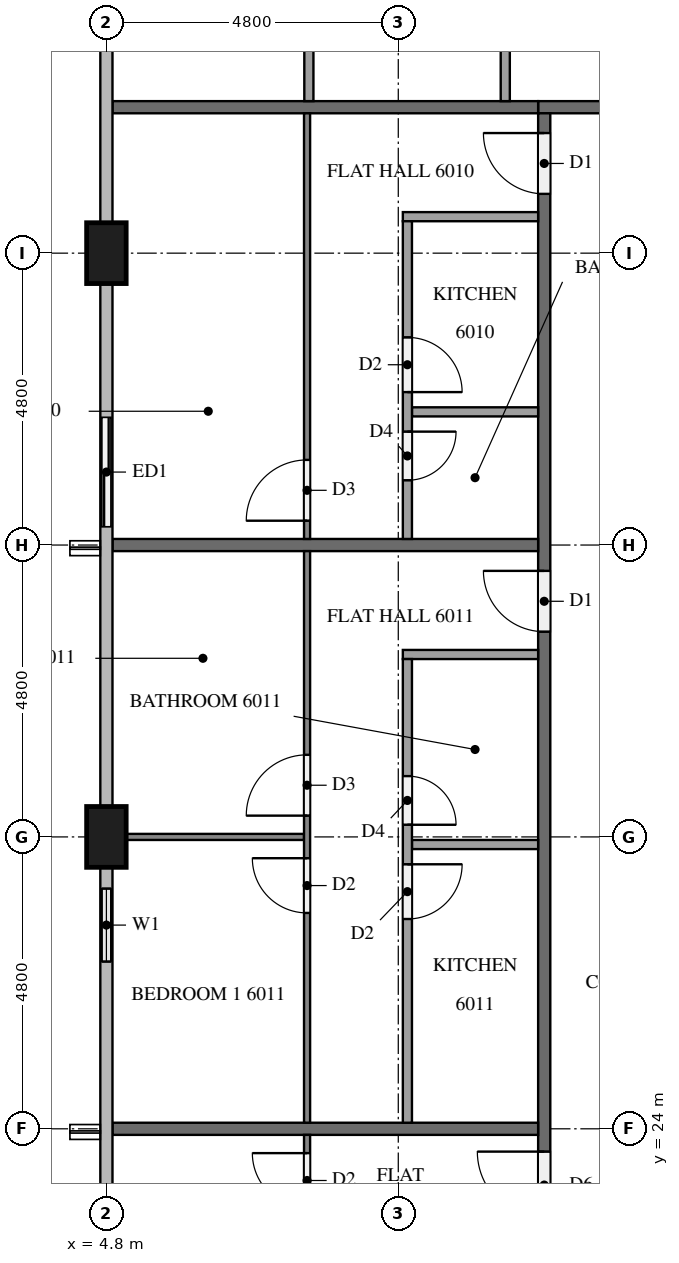
"""IFC4 building model, lengths in metres.
Left out: names, types, materials, properties, quantities, classifications, styles, units other than length and angle.
Written with IfcOpenShell. Run it as: python <this file> out.ifc"""

import sys

from ifc_helpers import new_model, si_unit, direction, frame, frame_2d, origin, origin_2d, place, context, subcontext, project, spatial, rectangle, extrude, element, fill, save


model = new_model("IFC4")
c1 = context("Model", 3, precision=1e-05, world=origin(), true_north=direction((0.0, 1.0)))
c2 = subcontext(c1, "Body", "Model", "MODEL_VIEW")
j1 = project(units=[si_unit("LENGTHUNIT", "METRE"), si_unit("PLANEANGLEUNIT", "RADIAN")], contexts=[c1])
p1 = place(None, origin())
s1 = spatial("IfcSite", under=j1, at=p1, CompositionType="ELEMENT")
p2 = place(p1, origin())
s2 = spatial("IfcBuilding", under=s1, at=p2, CompositionType="ELEMENT")
p3 = place(p2, frame((0.0, 0.0, 229.8)))
s3 = spatial("IfcBuildingStorey", under=s2, at=p3, CompositionType="ELEMENT", Elevation=229.8)
for number, where, z_axis, x_axis in (
    (1, (4.8, 38.4, 0.0), (0.0, 0.0, 1.0), (0.0, 1.0, 0.0)),
    (2, (4.8, 28.8, 0.0), (0.0, 0.0, 1.0), (0.0, 1.0, 0.0)),
):
    element("IfcColumn", number, at=place(p3, frame(where, z_axis=z_axis, x_axis=x_axis)), inside=s3, PredefinedType="COLUMN", context=c2, shape_type="SweptSolid", body=[
        extrude(rectangle(XDim=1.0, YDim=0.65, at=origin_2d()), origin(), (0.0, 0.0, 1.0), 3.1),
    ])
p4 = place(p3, frame((4.8, 36.0, 0.0), z_axis=(0.0, 0.0, 1.0), x_axis=(0.0, -1.0, 0.0)))
e3 = element("IfcWall", 3, at=p4, inside=s3, PredefinedType="SOLIDWALL", context=c2, shape_type="SweptSolid", body=[
    extrude(rectangle(XDim=2.4, YDim=0.15, at=frame_2d((1.2, 0.0))), origin(), (0.0, 0.0, 1.0), 3.1),
])
p5 = place(p4, frame((0.3, 0.0, 0.0)))
e4 = element("IfcOpeningElement", 4, at=p5, cuts=e3, PredefinedType="OPENING", context=c2, shape_type="SweptSolid", body=[
    extrude(rectangle(XDim=1.8, YDim=2.4, at=frame_2d((0.9, 1.2))), frame((0.0, 0.085, 0.0), z_axis=(0.0, -1.0, 0.0), x_axis=(1.0, 0.0, 0.0)), (0.0, 0.0, 1.0), 0.17),
])
p6 = place(p3, frame((4.8, 28.3, 0.0), z_axis=(0.0, 0.0, 1.0), x_axis=(0.0, -1.0, 0.0)))
e5 = element("IfcWall", 5, at=p6, inside=s3, PredefinedType="SOLIDWALL", context=c2, shape_type="SweptSolid", body=[
    extrude(rectangle(XDim=1.9, YDim=0.15, at=frame_2d((0.95, 0.0))), origin(), (0.0, 0.0, 1.0), 3.1),
])
p7 = place(p6, frame((0.35, 0.0, 0.9)))
e6 = element("IfcOpeningElement", 6, at=p7, cuts=e5, PredefinedType="OPENING", context=c2, shape_type="SweptSolid", body=[
    extrude(rectangle(XDim=1.2, YDim=1.4, at=frame_2d((0.6, 0.7))), frame((0.0, 0.085, 0.0), z_axis=(0.0, -1.0, 0.0), x_axis=(1.0, 0.0, 0.0)), (0.0, 0.0, 1.0), 0.17),
])
p8 = place(p3, frame((11.9, 40.8, 0.0), z_axis=(0.0, 0.0, 1.0), x_axis=(1.0, 0.0, 0.0)))
e7 = element("IfcWall", 7, at=p8, inside=s3, PredefinedType="PARTITIONING", context=c2, shape_type="SweptSolid", body=[
    extrude(rectangle(XDim=38.6, YDim=0.2, at=frame_2d((19.3, 0.0))), origin(), (0.0, 0.0, 1.0), 3.1),
])
p9 = place(p8, frame((37.075, 0.0, 0.0)))
e8 = element("IfcOpeningElement", 8, at=p9, cuts=e7, PredefinedType="OPENING", context=c2, shape_type="SweptSolid", body=[
    extrude(rectangle(XDim=1.0, YDim=2.1, at=frame_2d((0.5, 1.05))), frame((0.0, 0.11, 0.0), z_axis=(0.0, -1.0, 0.0), x_axis=(1.0, 0.0, 0.0)), (0.0, 0.0, 1.0), 0.22),
])
p10 = place(p8, frame((12.525, 0.0, 0.0)))
e9 = element("IfcOpeningElement", 9, at=p10, cuts=e7, PredefinedType="OPENING", context=c2, shape_type="SweptSolid", body=[
    extrude(rectangle(XDim=1.0, YDim=2.1, at=frame_2d((0.5, 1.05))), frame((0.0, 0.11, 0.0), z_axis=(0.0, -1.0, 0.0), x_axis=(1.0, 0.0, 0.0)), (0.0, 0.0, 1.0), 0.22),
])
p11 = place(p8, frame((10.625, 0.0, 0.0)))
e10 = element("IfcOpeningElement", 10, at=p11, cuts=e7, PredefinedType="OPENING", context=c2, shape_type="SweptSolid", body=[
    extrude(rectangle(XDim=1.1, YDim=2.1, at=frame_2d((0.55, 1.05))), frame((0.0, 0.11, 0.0), z_axis=(0.0, -1.0, 0.0), x_axis=(1.0, 0.0, 0.0)), (0.0, 0.0, 1.0), 0.22),
])
p12 = place(p3, frame((12.0, 12.1, 0.0), z_axis=(0.0, 0.0, 1.0), x_axis=(0.0, 1.0, 0.0)))
e11 = element("IfcWall", 11, at=p12, inside=s3, PredefinedType="PARTITIONING", context=c2, shape_type="SweptSolid", body=[
    extrude(rectangle(XDim=28.6, YDim=0.2, at=frame_2d((14.3, 0.0))), origin(), (0.0, 0.0, 1.0), 3.1),
])
p13 = place(p12, frame((27.275, 0.0, 0.0)))
e12 = element("IfcOpeningElement", 12, at=p13, cuts=e11, PredefinedType="OPENING", context=c2, shape_type="SweptSolid", body=[
    extrude(rectangle(XDim=1.0, YDim=2.1, at=frame_2d((0.5, 1.05))), frame((0.0, 0.11, 0.0), z_axis=(0.0, -1.0, 0.0), x_axis=(1.0, 0.0, 0.0)), (0.0, 0.0, 1.0), 0.22),
])
p14 = place(p12, frame((20.075, 0.0, 0.0)))
e13 = element("IfcOpeningElement", 13, at=p14, cuts=e11, PredefinedType="OPENING", context=c2, shape_type="SweptSolid", body=[
    extrude(rectangle(XDim=1.0, YDim=2.1, at=frame_2d((0.5, 1.05))), frame((0.0, 0.11, 0.0), z_axis=(0.0, -1.0, 0.0), x_axis=(1.0, 0.0, 0.0)), (0.0, 0.0, 1.0), 0.22),
])
p15 = place(p12, frame((10.425, 0.0, 0.0)))
e14 = element("IfcOpeningElement", 14, at=p15, cuts=e11, PredefinedType="OPENING", context=c2, shape_type="SweptSolid", body=[
    extrude(rectangle(XDim=1.1, YDim=2.1, at=frame_2d((0.55, 1.05))), frame((0.0, 0.11, 0.0), z_axis=(0.0, -1.0, 0.0), x_axis=(1.0, 0.0, 0.0)), (0.0, 0.0, 1.0), 0.22),
])
for number, where, z_axis, x_axis in (
    (15, (4.9, 40.8, 0.0), (0.0, 0.0, 1.0), (1.0, 0.0, 0.0)),
    (16, (4.9, 33.6, 0.0), (0.0, 0.0, 1.0), (1.0, 0.0, 0.0)),
    (17, (4.9, 24.0, 0.0), (0.0, 0.0, 1.0), (1.0, 0.0, 0.0)),
):
    element("IfcWall", number, at=place(p3, frame(where, z_axis=z_axis, x_axis=x_axis)), inside=s3, PredefinedType="PARTITIONING", context=c2, shape_type="SweptSolid", body=[
        extrude(rectangle(XDim=7.0, YDim=0.2, at=frame_2d((3.5, 0.0))), origin(), (0.0, 0.0, 1.0), 3.1),
    ])
for number, where, z_axis, x_axis in (
    (18, (11.359, 40.9, 0.0), (0.0, 0.0, 1.0), (0.0, 1.0, 0.0)),
    (19, (8.13, 40.9, 0.0), (0.0, 0.0, 1.0), (0.0, 1.0, 0.0)),
):
    element("IfcWall", number, at=place(p3, frame(where, z_axis=z_axis, x_axis=x_axis)), inside=s3, PredefinedType="PARTITIONING", context=c2, shape_type="SweptSolid", body=[
        extrude(rectangle(XDim=3.275, YDim=0.15, at=frame_2d((1.638, 0.0))), origin(), (0.0, 0.0, 1.0), 3.1),
    ])
p16 = place(p3, frame((8.1, 33.7, 0.0), z_axis=(0.0, 0.0, 1.0), x_axis=(0.0, 1.0, 0.0)))
e20 = element("IfcWall", 20, at=p16, inside=s3, PredefinedType="PARTITIONING", context=c2, shape_type="SweptSolid", body=[
    extrude(rectangle(XDim=7.0, YDim=0.1, at=frame_2d((3.5, 0.0))), origin(), (0.0, 0.0, 1.0), 3.1),
])
p17 = place(p16, frame((0.3, 0.0, 0.0)))
e21 = element("IfcOpeningElement", 21, at=p17, cuts=e20, PredefinedType="OPENING", context=c2, shape_type="SweptSolid", body=[
    extrude(rectangle(XDim=1.0, YDim=2.1, at=frame_2d((0.5, 1.05))), frame((0.0, 0.06, 0.0), z_axis=(0.0, -1.0, 0.0), x_axis=(1.0, 0.0, 0.0)), (0.0, 0.0, 1.0), 0.12),
])
p18 = place(p3, frame((11.9, 35.79, 0.0), z_axis=(0.0, 0.0, 1.0), x_axis=(-1.0, 0.0, 0.0)))
e22 = element("IfcWall", 22, at=p18, inside=s3, PredefinedType="PARTITIONING", context=c2, shape_type="SweptSolid", body=[
    extrude(rectangle(XDim=2.075, YDim=0.15, at=frame_2d((1.038, 0.0))), origin(), (0.0, 0.0, 1.0), 3.1),
])
p19 = place(p3, frame((11.9, 39.0, 0.0), z_axis=(0.0, 0.0, 1.0), x_axis=(-1.0, 0.0, 0.0)))
e23 = element("IfcWall", 23, at=p19, inside=s3, PredefinedType="PARTITIONING", context=c2, shape_type="SweptSolid", body=[
    extrude(rectangle(XDim=2.225, YDim=0.15, at=frame_2d((1.112, 0.0))), origin(), (0.0, 0.0, 1.0), 3.1),
])
p20 = place(p3, frame((9.75, 38.925, 0.0), z_axis=(0.0, 0.0, 1.0), x_axis=(0.0, -1.0, 0.0)))
e24 = element("IfcWall", 24, at=p20, inside=s3, PredefinedType="PARTITIONING", context=c2, shape_type="SweptSolid", body=[
    extrude(rectangle(XDim=5.225, YDim=0.15, at=frame_2d((2.613, 0.0))), origin(), (0.0, 0.0, 1.0), 3.1),
])
p21 = place(p20, frame((1.91, 0.0, 0.0)))
e25 = element("IfcOpeningElement", 25, at=p21, cuts=e24, PredefinedType="OPENING", context=c2, shape_type="SweptSolid", body=[
    extrude(rectangle(XDim=0.9, YDim=2.1, at=frame_2d((0.45, 1.05))), frame((0.0, 0.085, 0.0), z_axis=(0.0, -1.0, 0.0), x_axis=(1.0, 0.0, 0.0)), (0.0, 0.0, 1.0), 0.17),
])
p22 = place(p20, frame((3.46, 0.0, 0.0)))
e26 = element("IfcOpeningElement", 26, at=p22, cuts=e24, PredefinedType="OPENING", context=c2, shape_type="SweptSolid", body=[
    extrude(rectangle(XDim=0.8, YDim=2.1, at=frame_2d((0.4, 1.05))), frame((0.0, 0.085, 0.0), z_axis=(0.0, -1.0, 0.0), x_axis=(1.0, 0.0, 0.0)), (0.0, 0.0, 1.0), 0.17),
])
p23 = place(p3, frame((8.05, 28.8, 0.0), z_axis=(0.0, 0.0, 1.0), x_axis=(-1.0, 0.0, 0.0)))
e27 = element("IfcWall", 27, at=p23, inside=s3, PredefinedType="PARTITIONING", context=c2, shape_type="SweptSolid", body=[
    extrude(rectangle(XDim=2.925, YDim=0.1, at=frame_2d((1.462, 0.0))), origin(), (0.0, 0.0, 1.0), 3.1),
])
p24 = place(p3, frame((8.1, 24.1, 0.0), z_axis=(0.0, 0.0, 1.0), x_axis=(0.0, 1.0, 0.0)))
e28 = element("IfcWall", 28, at=p24, inside=s3, PredefinedType="PARTITIONING", context=c2, shape_type="SweptSolid", body=[
    extrude(rectangle(XDim=9.4, YDim=0.1, at=frame_2d((4.7, 0.0))), origin(), (0.0, 0.0, 1.0), 3.1),
])
p25 = place(p24, frame((5.05, 0.0, 0.0)))
e29 = element("IfcOpeningElement", 29, at=p25, cuts=e28, PredefinedType="OPENING", context=c2, shape_type="SweptSolid", body=[
    extrude(rectangle(XDim=1.0, YDim=2.1, at=frame_2d((0.5, 1.05))), frame((0.0, 0.06, 0.0), z_axis=(0.0, -1.0, 0.0), x_axis=(1.0, 0.0, 0.0)), (0.0, 0.0, 1.0), 0.12),
])
p26 = place(p24, frame((3.45, 0.0, 0.0)))
e30 = element("IfcOpeningElement", 30, at=p26, cuts=e28, PredefinedType="OPENING", context=c2, shape_type="SweptSolid", body=[
    extrude(rectangle(XDim=0.9, YDim=2.1, at=frame_2d((0.45, 1.05))), frame((0.0, 0.06, 0.0), z_axis=(0.0, -1.0, 0.0), x_axis=(1.0, 0.0, 0.0)), (0.0, 0.0, 1.0), 0.12),
])
p27 = place(p3, frame((11.9, 28.675, 0.0), z_axis=(0.0, 0.0, 1.0), x_axis=(-1.0, 0.0, 0.0)))
e31 = element("IfcWall", 31, at=p27, inside=s3, PredefinedType="PARTITIONING", context=c2, shape_type="SweptSolid", body=[
    extrude(rectangle(XDim=2.075, YDim=0.15, at=frame_2d((1.038, 0.0))), origin(), (0.0, 0.0, 1.0), 3.1),
])
p28 = place(p3, frame((11.9, 31.8, 0.0), z_axis=(0.0, 0.0, 1.0), x_axis=(-1.0, 0.0, 0.0)))
e32 = element("IfcWall", 32, at=p28, inside=s3, PredefinedType="PARTITIONING", context=c2, shape_type="SweptSolid", body=[
    extrude(rectangle(XDim=2.225, YDim=0.15, at=frame_2d((1.112, 0.0))), origin(), (0.0, 0.0, 1.0), 3.1),
])
p29 = place(p3, frame((9.75, 31.725, 0.0), z_axis=(0.0, 0.0, 1.0), x_axis=(0.0, -1.0, 0.0)))
e33 = element("IfcWall", 33, at=p29, inside=s3, PredefinedType="PARTITIONING", context=c2, shape_type="SweptSolid", body=[
    extrude(rectangle(XDim=7.625, YDim=0.15, at=frame_2d((3.812, 0.0))), origin(), (0.0, 0.0, 1.0), 3.1),
])
p30 = place(p29, frame((1.925, 0.0, 0.0)))
e34 = element("IfcOpeningElement", 34, at=p30, cuts=e33, PredefinedType="OPENING", context=c2, shape_type="SweptSolid", body=[
    extrude(rectangle(XDim=0.8, YDim=2.1, at=frame_2d((0.4, 1.05))), frame((0.0, 0.085, 0.0), z_axis=(0.0, -1.0, 0.0), x_axis=(1.0, 0.0, 0.0)), (0.0, 0.0, 1.0), 0.17),
])
p31 = place(p29, frame((3.375, 0.0, 0.0)))
e35 = element("IfcOpeningElement", 35, at=p31, cuts=e33, PredefinedType="OPENING", context=c2, shape_type="SweptSolid", body=[
    extrude(rectangle(XDim=0.9, YDim=2.1, at=frame_2d((0.45, 1.05))), frame((0.0, 0.085, 0.0), z_axis=(0.0, -1.0, 0.0), x_axis=(1.0, 0.0, 0.0)), (0.0, 0.0, 1.0), 0.17),
])
p32 = place(p3, frame((8.1, 5.302, 0.0), z_axis=(0.0, 0.0, 1.0), x_axis=(0.0, 1.0, 0.0)))
e36 = element("IfcWall", 36, at=p32, inside=s3, PredefinedType="PARTITIONING", context=c2, shape_type="SweptSolid", body=[
    extrude(rectangle(XDim=18.598, YDim=0.1, at=frame_2d((9.299, 0.0))), origin(), (0.0, 0.0, 1.0), 3.1),
])
p33 = place(p32, frame((17.398, 0.0, 0.0)))
e37 = element("IfcOpeningElement", 37, at=p33, cuts=e36, PredefinedType="OPENING", context=c2, shape_type="SweptSolid", body=[
    extrude(rectangle(XDim=0.9, YDim=2.1, at=frame_2d((0.45, 1.05))), frame((0.0, 0.06, 0.0), z_axis=(0.0, -1.0, 0.0), x_axis=(1.0, 0.0, 0.0)), (0.0, 0.0, 1.0), 0.12),
])
p34 = place(p32, frame((9.448, 0.0, 0.0)))
e38 = element("IfcOpeningElement", 38, at=p34, cuts=e36, PredefinedType="OPENING", context=c2, shape_type="SweptSolid", body=[
    extrude(rectangle(XDim=0.9, YDim=2.1, at=frame_2d((0.45, 1.05))), frame((0.0, 0.06, 0.0), z_axis=(0.0, -1.0, 0.0), x_axis=(1.0, 0.0, 0.0)), (0.0, 0.0, 1.0), 0.12),
])
p35 = place(p32, frame((7.748, 0.0, 0.0)))
e39 = element("IfcOpeningElement", 39, at=p35, cuts=e36, PredefinedType="OPENING", context=c2, shape_type="SweptSolid", body=[
    extrude(rectangle(XDim=1.0, YDim=2.1, at=frame_2d((0.5, 1.05))), frame((0.0, 0.06, 0.0), z_axis=(0.0, -1.0, 0.0), x_axis=(1.0, 0.0, 0.0)), (0.0, 0.0, 1.0), 0.12),
])
p36 = place(p32, frame((0.3, 0.0, 0.0)))
e40 = element("IfcOpeningElement", 40, at=p36, cuts=e36, PredefinedType="OPENING", context=c2, shape_type="SweptSolid", body=[
    extrude(rectangle(XDim=0.9, YDim=2.1, at=frame_2d((0.45, 1.05))), frame((0.0, 0.06, 0.0), z_axis=(0.0, -1.0, 0.0), x_axis=(1.0, 0.0, 0.0)), (0.0, 0.0, 1.0), 0.12),
])
p37 = place(p5, origin())
e41 = element("IfcDoor", 41, at=p37, inside=s3, OperationType="SLIDING_TO_RIGHT", PredefinedType="DOOR", context=c2, shape_type="SweptSolid", body=[
    extrude(rectangle(XDim=1.8, YDim=2.4, at=frame_2d((0.9, 1.2))), frame((0.0, 0.025, 0.0), z_axis=(0.0, -1.0, 0.0), x_axis=(1.0, 0.0, 0.0)), (0.0, 0.0, 1.0), 0.05),
])
fill(e4, e41)
p38 = place(p7, origin())
e42 = element("IfcWindow", 42, at=p38, inside=s3, PartitioningType="SINGLE_PANEL", PredefinedType="WINDOW", context=c2, shape_type="SweptSolid", body=[
    extrude(rectangle(XDim=1.2, YDim=1.4, at=frame_2d((0.6, 0.7))), frame((0.0, 0.03, 0.0), z_axis=(0.0, -1.0, 0.0), x_axis=(1.0, 0.0, 0.0)), (0.0, 0.0, 1.0), 0.06),
])
fill(e6, e42)
p39 = place(p13, origin())
e43 = element("IfcDoor", 43, at=p39, inside=s3, OperationType="SINGLE_SWING_RIGHT", PredefinedType="DOOR", context=c2, shape_type="SweptSolid", body=[
    extrude(rectangle(XDim=1.0, YDim=2.1, at=frame_2d((0.5, 1.05))), frame((0.0, 0.025, 0.0), z_axis=(0.0, -1.0, 0.0), x_axis=(1.0, 0.0, 0.0)), (0.0, 0.0, 1.0), 0.05),
])
fill(e12, e43)
p40 = place(p14, origin())
e44 = element("IfcDoor", 44, at=p40, inside=s3, OperationType="SINGLE_SWING_RIGHT", PredefinedType="DOOR", context=c2, shape_type="SweptSolid", body=[
    extrude(rectangle(XDim=1.0, YDim=2.1, at=frame_2d((0.5, 1.05))), frame((0.0, 0.025, 0.0), z_axis=(0.0, -1.0, 0.0), x_axis=(1.0, 0.0, 0.0)), (0.0, 0.0, 1.0), 0.05),
])
fill(e13, e44)
p41 = place(p15, origin())
e45 = element("IfcDoor", 45, at=p41, inside=s3, OperationType="SINGLE_SWING_RIGHT", PredefinedType="DOOR", context=c2, shape_type="SweptSolid", body=[
    extrude(rectangle(XDim=1.1, YDim=2.1, at=frame_2d((0.55, 1.05))), frame((0.0, 0.025, 0.0), z_axis=(0.0, -1.0, 0.0), x_axis=(1.0, 0.0, 0.0)), (0.0, 0.0, 1.0), 0.05),
])
fill(e14, e45)
p42 = place(p17, origin())
e46 = element("IfcDoor", 46, at=p42, inside=s3, OperationType="SINGLE_SWING_LEFT", PredefinedType="DOOR", context=c2, shape_type="SweptSolid", body=[
    extrude(rectangle(XDim=1.0, YDim=2.1, at=frame_2d((0.5, 1.05))), frame((0.0, 0.025, 0.0), z_axis=(0.0, -1.0, 0.0), x_axis=(1.0, 0.0, 0.0)), (0.0, 0.0, 1.0), 0.05),
])
fill(e21, e46)
p43 = place(p21, origin())
e47 = element("IfcDoor", 47, at=p43, inside=s3, OperationType="SINGLE_SWING_RIGHT", PredefinedType="DOOR", context=c2, shape_type="SweptSolid", body=[
    extrude(rectangle(XDim=0.9, YDim=2.1, at=frame_2d((0.45, 1.05))), frame((0.0, 0.025, 0.0), z_axis=(0.0, -1.0, 0.0), x_axis=(1.0, 0.0, 0.0)), (0.0, 0.0, 1.0), 0.05),
])
fill(e25, e47)
p44 = place(p22, origin())
e48 = element("IfcDoor", 48, at=p44, inside=s3, OperationType="SINGLE_SWING_LEFT", PredefinedType="DOOR", context=c2, shape_type="SweptSolid", body=[
    extrude(rectangle(XDim=0.8, YDim=2.1, at=frame_2d((0.4, 1.05))), frame((0.0, 0.025, 0.0), z_axis=(0.0, -1.0, 0.0), x_axis=(1.0, 0.0, 0.0)), (0.0, 0.0, 1.0), 0.05),
])
fill(e26, e48)
p45 = place(p25, origin())
e49 = element("IfcDoor", 49, at=p45, inside=s3, OperationType="SINGLE_SWING_LEFT", PredefinedType="DOOR", context=c2, shape_type="SweptSolid", body=[
    extrude(rectangle(XDim=1.0, YDim=2.1, at=frame_2d((0.5, 1.05))), frame((0.0, 0.025, 0.0), z_axis=(0.0, -1.0, 0.0), x_axis=(1.0, 0.0, 0.0)), (0.0, 0.0, 1.0), 0.05),
])
fill(e29, e49)
p46 = place(p26, origin())
e50 = element("IfcDoor", 50, at=p46, inside=s3, OperationType="SINGLE_SWING_RIGHT", PredefinedType="DOOR", context=c2, shape_type="SweptSolid", body=[
    extrude(rectangle(XDim=0.9, YDim=2.1, at=frame_2d((0.45, 1.05))), frame((0.0, 0.025, 0.0), z_axis=(0.0, -1.0, 0.0), x_axis=(1.0, 0.0, 0.0)), (0.0, 0.0, 1.0), 0.05),
])
fill(e30, e50)
p47 = place(p30, origin())
e51 = element("IfcDoor", 51, at=p47, inside=s3, OperationType="SINGLE_SWING_RIGHT", PredefinedType="DOOR", context=c2, shape_type="SweptSolid", body=[
    extrude(rectangle(XDim=0.8, YDim=2.1, at=frame_2d((0.4, 1.05))), frame((0.0, 0.025, 0.0), z_axis=(0.0, -1.0, 0.0), x_axis=(1.0, 0.0, 0.0)), (0.0, 0.0, 1.0), 0.05),
])
fill(e34, e51)
p48 = place(p31, origin())
e52 = element("IfcDoor", 52, at=p48, inside=s3, OperationType="SINGLE_SWING_LEFT", PredefinedType="DOOR", context=c2, shape_type="SweptSolid", body=[
    extrude(rectangle(XDim=0.9, YDim=2.1, at=frame_2d((0.45, 1.05))), frame((0.0, 0.025, 0.0), z_axis=(0.0, -1.0, 0.0), x_axis=(1.0, 0.0, 0.0)), (0.0, 0.0, 1.0), 0.05),
])
fill(e35, e52)
p49 = place(p33, origin())
e53 = element("IfcDoor", 53, at=p49, inside=s3, OperationType="SINGLE_SWING_RIGHT", PredefinedType="DOOR", context=c2, shape_type="SweptSolid", body=[
    extrude(rectangle(XDim=0.9, YDim=2.1, at=frame_2d((0.45, 1.05))), frame((0.0, 0.025, 0.0), z_axis=(0.0, -1.0, 0.0), x_axis=(1.0, 0.0, 0.0)), (0.0, 0.0, 1.0), 0.05),
])
fill(e37, e53)
save(model, sys.argv[1])
